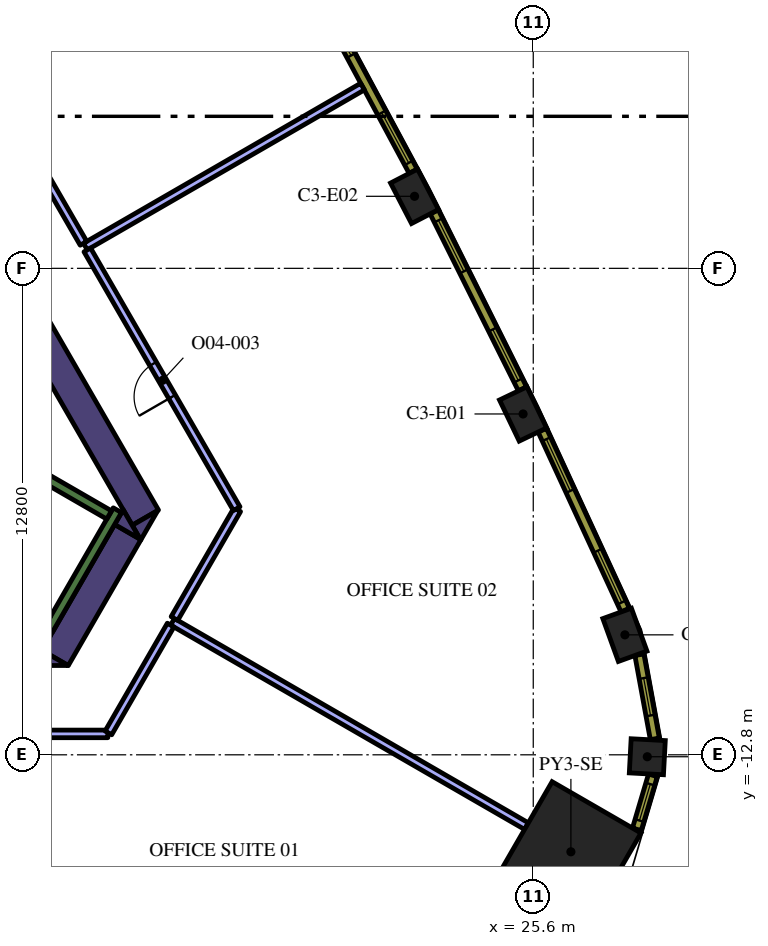
"""IFC4 building model, lengths in metres.
Left out: names, types, materials, properties, quantities, classifications, styles, units other than length and angle.
Written with IfcOpenShell. Run it as: python <this file> out.ifc"""

import sys

from ifc_helpers import new_model, si_unit, direction, frame, frame_2d, origin, origin_2d, place, context, subcontext, project, spatial, polyline, rectangle, outline, extrude, element, fill, save


model = new_model("IFC4")
c1 = context("Model", 3, precision=1e-05, world=origin(), true_north=direction((0.0, 1.0)))
c2 = subcontext(c1, "Body", "Model", "MODEL_VIEW")
j1 = project(units=[si_unit("LENGTHUNIT", "METRE"), si_unit("PLANEANGLEUNIT", "RADIAN")], contexts=[c1])
p1 = place(None, origin())
s1 = spatial("IfcSite", under=j1, at=p1, CompositionType="ELEMENT")
p2 = place(p1, origin())
s2 = spatial("IfcBuilding", under=s1, at=p2, CompositionType="ELEMENT")
p3 = place(p2, frame((0.0, 0.0, 187.8)))
s3 = spatial("IfcBuildingStorey", under=s2, at=p3, CompositionType="ELEMENT", Elevation=187.8)
p4 = place(p3, frame((26.591, -15.352, 0.0), z_axis=(0.0, 0.0, 1.0), x_axis=(0.866025403784, -0.5, 0.0)))
e1 = element("IfcColumn", 1, at=p4, inside=s3, PredefinedType="COLUMN", context=c2, shape_type="SweptSolid", body=[
    extrude(rectangle(XDim=2.7, YDim=2.7, at=origin_2d()), origin(), (0.0, 0.0, 1.0), 4.2),
])
p5 = place(p3, frame((28.601, -12.851, 0.0), z_axis=(0.0, 0.0, 1.0), x_axis=(0.0533921468, 0.998573622053, 0.0)))
e2 = element("IfcColumn", 2, at=p5, inside=s3, PredefinedType="COLUMN", context=c2, shape_type="SweptSolid", body=[
    extrude(rectangle(XDim=0.9, YDim=0.9, at=origin_2d()), origin(), (0.0, 0.0, 1.0), 4.2),
])
for number, where, z_axis, x_axis in (
    (3, (28.012, -9.644, 0.0), (0.0, 0.0, 1.0), (-0.341, 0.94, 0.0)),
    (4, (25.332, -3.832, 0.0), (0.0, 0.0, 1.0), (-0.433, 0.902, 0.0)),
    (5, (22.476, 1.896, 0.0), (0.0, 0.0, 1.0), (-0.46, 0.888, 0.0)),
):
    element("IfcColumn", number, at=place(p3, frame(where, z_axis=z_axis, x_axis=x_axis)), inside=s3, PredefinedType="COLUMN", context=c2, shape_type="SweptSolid", body=[
        extrude(rectangle(XDim=1.2, YDim=0.8, at=origin_2d()), origin(), (0.0, 0.0, 1.0), 4.2),
    ])
p6 = place(p3, frame((9.129, 4.289, 0.0), z_axis=(0.0, 0.0, 1.0), x_axis=(0.499995742806, -0.866027861663, 0.0)))
e6 = element("IfcWall", 6, at=p6, inside=s3, PredefinedType="SOLIDWALL", context=c2, shape_type="SweptSolid", body=[
    extrude(rectangle(XDim=12.527, YDim=0.8, at=frame_2d((6.264, 0.0))), origin(), (0.0, 0.0, 1.0), 4.2),
])
p7 = place(p3, origin())
e7 = element("IfcWall", 7, at=p7, inside=s3, PredefinedType="SOLIDWALL", context=c2, shape_type="SweptSolid", body=[
    extrude(outline(polyline([(15.271, -7.15), (15.047, -6.762), (15.719, -6.374), (15.271, -7.15)])), origin(), (0.0, 0.0, 1.0), 4.2),
])
p8 = place(p3, frame((13.018, -10.252, 0.0), z_axis=(0.0, 0.0, 1.0), x_axis=(0.499984020225, 0.866034629516, 0.0)))
e8 = element("IfcWall", 8, at=p8, inside=s3, PredefinedType="SOLIDWALL", context=c2, shape_type="SweptSolid", body=[
    extrude(rectangle(XDim=3.824, YDim=0.8, at=frame_2d((1.912, 0.0))), origin(), (0.0, 0.0, 1.0), 4.2),
])
e9 = element("IfcWall", 9, at=p7, inside=s3, PredefinedType="SOLIDWALL", context=c2, shape_type="SweptSolid", body=[
    extrude(outline(polyline([(12.671, -10.053), (13.358, -10.45), (12.442, -10.45), (12.671, -10.053)])), origin(), (0.0, 0.0, 1.0), 4.2),
])
e10 = element("IfcWall", 10, at=p7, inside=s3, PredefinedType="SOLIDWALL", context=c2, shape_type="SweptSolid", body=[
    extrude(outline(polyline([(14.809, -6.35), (15.257, -7.126), (14.585, -6.738), (14.809, -6.35)])), origin(), (0.0, 0.0, 1.0), 4.2),
])
p9 = place(p3, frame((12.84, -9.511, 0.0), z_axis=(0.0, 0.0, 1.0), x_axis=(0.499997733992, 0.866026712061, 0.0)))
e11 = element("IfcWall", 11, at=p9, inside=s3, PredefinedType="SOLIDWALL", context=c2, shape_type="SweptSolid", body=[
    extrude(rectangle(XDim=3.634, YDim=0.25, at=frame_2d((1.817, 0.0))), origin(), (0.0, 0.0, 1.0), 4.2),
])
p10 = place(p3, frame((8.334, -2.964, 0.0), z_axis=(0.0, 0.0, 1.0), x_axis=(0.866016039709, -0.500016218704, 0.0)))
e12 = element("IfcWall", 12, at=p10, inside=s3, PredefinedType="SOLIDWALL", context=c2, shape_type="SweptSolid", body=[
    extrude(rectangle(XDim=7.05, YDim=0.25, at=frame_2d((3.525, 0.0))), origin(), (0.0, 0.0, 1.0), 4.2),
])
p11 = place(p3, frame((16.108, -9.3, 0.0), z_axis=(0.0, 0.0, 1.0), x_axis=(0.866027180319, -0.499996922939, 0.0)))
e13 = element("IfcWall", 13, at=p11, inside=s3, PredefinedType="PARTITIONING", context=c2, shape_type="SweptSolid", body=[
    extrude(rectangle(XDim=10.754, YDim=0.2, at=frame_2d((5.377, 0.0))), origin(), (0.0, 0.0, 1.0), 3.15),
])
p12 = place(p3, frame((9.717, -12.25, 0.0), z_axis=(0.0, 0.0, 1.0), x_axis=(1.0, 0.0, 0.0)))
e14 = element("IfcWall", 14, at=p12, inside=s3, PredefinedType="PARTITIONING", context=c2, shape_type="SweptSolid", body=[
    extrude(rectangle(XDim=4.688, YDim=0.2, at=frame_2d((2.344, 0.0))), origin(), (0.0, 0.0, 1.0), 3.15),
])
p13 = place(p12, frame((1.8, 0.0, 0.0)))
e15 = element("IfcOpeningElement", 15, at=p13, cuts=e14, PredefinedType="OPENING", context=c2, shape_type="SweptSolid", body=[
    extrude(rectangle(XDim=1.0, YDim=2.1, at=frame_2d((0.5, 1.05))), frame((0.0, 0.11, 0.0), z_axis=(0.0, -1.0, 0.0), x_axis=(1.0, 0.0, 0.0)), (0.0, 0.0, 1.0), 0.22),
])
p14 = place(p3, frame((14.42, -12.224, 0.0), z_axis=(0.0, 0.0, 1.0), x_axis=(0.500001965626, 0.866024268927, 0.0)))
e16 = element("IfcWall", 16, at=p14, inside=s3, PredefinedType="PARTITIONING", context=c2, shape_type="SweptSolid", body=[
    extrude(rectangle(XDim=3.276, YDim=0.2, at=frame_2d((1.638, 0.0))), origin(), (0.0, 0.0, 1.0), 3.15),
])
p15 = place(p3, frame((13.815, 0.572, 0.0), z_axis=(0.0, 0.0, 1.0), x_axis=(0.866036391575, 0.499980968105, 0.0)))
e17 = element("IfcWall", 17, at=p15, inside=s3, PredefinedType="PARTITIONING", context=c2, shape_type="SweptSolid", body=[
    extrude(rectangle(XDim=8.42, YDim=0.2, at=frame_2d((4.21, 0.0))), origin(), (0.0, 0.0, 1.0), 3.15),
])
p16 = place(p3, frame((16.158, -9.213, 0.0), z_axis=(0.0, 0.0, 1.0), x_axis=(0.499990919662, 0.866030646256, 0.0)))
e18 = element("IfcWall", 18, at=p16, inside=s3, PredefinedType="PARTITIONING", context=c2, shape_type="SweptSolid", body=[
    extrude(rectangle(XDim=3.306, YDim=0.2, at=frame_2d((1.653, 0.0))), origin(), (0.0, 0.0, 1.0), 3.15),
])
p17 = place(p3, frame((17.796, -6.324, 0.0), z_axis=(0.0, 0.0, 1.0), x_axis=(-0.500026166427, 0.866010296064, 0.0)))
e19 = element("IfcWall", 19, at=p17, inside=s3, PredefinedType="PARTITIONING", context=c2, shape_type="SweptSolid", body=[
    extrude(rectangle(XDim=7.863, YDim=0.2, at=frame_2d((3.931, 0.0))), origin(), (0.0, 0.0, 1.0), 3.15),
])
p18 = place(p17, frame((3.4, 0.0, 0.0)))
e20 = element("IfcOpeningElement", 20, at=p18, cuts=e19, PredefinedType="OPENING", context=c2, shape_type="SweptSolid", body=[
    extrude(rectangle(XDim=1.0, YDim=2.1, at=frame_2d((0.5, 1.05))), frame((0.0, 0.11, 0.0), z_axis=(0.0, -1.0, 0.0), x_axis=(1.0, 0.0, 0.0)), (0.0, 0.0, 1.0), 0.22),
])
p19 = place(p3, frame((13.765, 0.659, 0.0), z_axis=(0.0, 0.0, 1.0), x_axis=(-0.500046568876, 0.865998515562, 0.0)))
e21 = element("IfcWall", 21, at=p19, inside=s3, PredefinedType="PARTITIONING", context=c2, shape_type="SweptSolid", body=[
    extrude(rectangle(XDim=2.782, YDim=0.2, at=frame_2d((1.391, 0.0))), origin(), (0.0, 0.0, 1.0), 3.15),
])
p20 = place(p3, frame((28.326, -14.76, 0.0), z_axis=(0.0, 0.0, 1.0), x_axis=(0.284413721403, 0.958701640281, 0.0)))
e22 = element("IfcWall", 22, at=p20, inside=s3, PredefinedType="SOLIDWALL", context=c2, shape_type="SweptSolid", body=[
    extrude(rectangle(XDim=1.482, YDim=0.24, at=frame_2d((0.741, 0.0))), origin(), (0.0, 0.0, 1.0), 3.95),
])
p21 = place(p20, frame((0.241, 0.0, 0.9)))
e23 = element("IfcOpeningElement", 23, at=p21, cuts=e22, PredefinedType="OPENING", context=c2, shape_type="SweptSolid", body=[
    extrude(rectangle(XDim=1.0, YDim=2.55, at=frame_2d((0.5, 1.275))), frame((0.0, 0.13, 0.0), z_axis=(0.0, -1.0, 0.0), x_axis=(1.0, 0.0, 0.0)), (0.0, 0.0, 1.0), 0.26),
])
p22 = place(p3, frame((28.799, -12.38, 0.0), z_axis=(0.0, 0.0, 1.0), x_axis=(-0.180737189259, 0.983531427265, 0.0)))
e24 = element("IfcWall", 24, at=p22, inside=s3, PredefinedType="SOLIDWALL", context=c2, shape_type="SweptSolid", body=[
    extrude(rectangle(XDim=2.25, YDim=0.24, at=frame_2d((1.125, 0.0))), origin(), (0.0, 0.0, 1.0), 3.95),
])
p23 = place(p22, frame((0.625, 0.0, 0.9)))
e25 = element("IfcOpeningElement", 25, at=p23, cuts=e24, PredefinedType="OPENING", context=c2, shape_type="SweptSolid", body=[
    extrude(rectangle(XDim=1.0, YDim=2.55, at=frame_2d((0.5, 1.275))), frame((0.0, 0.13, 0.0), z_axis=(0.0, -1.0, 0.0), x_axis=(1.0, 0.0, 0.0)), (0.0, 0.0, 1.0), 0.26),
])
p24 = place(p3, frame((28.02, -8.992, 0.0), z_axis=(0.0, 0.0, 1.0), x_axis=(-0.418722559465, 0.908114209885, 0.0)))
e26 = element("IfcWall", 26, at=p24, inside=s3, PredefinedType="SOLIDWALL", context=c2, shape_type="SweptSolid", body=[
    extrude(rectangle(XDim=5.213, YDim=0.24, at=frame_2d((2.606, 0.0))), origin(), (0.0, 0.0, 1.0), 3.95),
])
p25 = place(p24, frame((0.221, 0.0, 0.9)))
e27 = element("IfcOpeningElement", 27, at=p25, cuts=e26, PredefinedType="OPENING", context=c2, shape_type="SweptSolid", body=[
    extrude(rectangle(XDim=1.5, YDim=2.55, at=frame_2d((0.75, 1.275))), frame((0.0, 0.13, 0.0), z_axis=(0.0, -1.0, 0.0), x_axis=(1.0, 0.0, 0.0)), (0.0, 0.0, 1.0), 0.26),
])
p26 = place(p24, frame((3.452, 0.0, 0.9)))
e28 = element("IfcOpeningElement", 28, at=p26, cuts=e26, PredefinedType="OPENING", context=c2, shape_type="SweptSolid", body=[
    extrude(rectangle(XDim=1.5, YDim=2.55, at=frame_2d((0.75, 1.275))), frame((0.0, 0.13, 0.0), z_axis=(0.0, -1.0, 0.0), x_axis=(1.0, 0.0, 0.0)), (0.0, 0.0, 1.0), 0.26),
])
p27 = place(p3, frame((25.316, -3.171, 0.0), z_axis=(0.0, 0.0, 1.0), x_axis=(-0.446256171312, 0.8949052629, 0.0)))
e29 = element("IfcWall", 29, at=p27, inside=s3, PredefinedType="SOLIDWALL", context=c2, shape_type="SweptSolid", body=[
    extrude(rectangle(XDim=5.203, YDim=0.24, at=frame_2d((2.602, 0.0))), origin(), (0.0, 0.0, 1.0), 3.95),
])
p28 = place(p27, frame((0.248, 0.0, 0.9)))
e30 = element("IfcOpeningElement", 30, at=p28, cuts=e29, PredefinedType="OPENING", context=c2, shape_type="SweptSolid", body=[
    extrude(rectangle(XDim=1.5, YDim=2.55, at=frame_2d((0.75, 1.275))), frame((0.0, 0.13, 0.0), z_axis=(0.0, -1.0, 0.0), x_axis=(1.0, 0.0, 0.0)), (0.0, 0.0, 1.0), 0.26),
])
p29 = place(p27, frame((3.455, 0.0, 0.9)))
e31 = element("IfcOpeningElement", 31, at=p29, cuts=e29, PredefinedType="OPENING", context=c2, shape_type="SweptSolid", body=[
    extrude(rectangle(XDim=1.5, YDim=2.55, at=frame_2d((0.75, 1.275))), frame((0.0, 0.13, 0.0), z_axis=(0.0, -1.0, 0.0), x_axis=(1.0, 0.0, 0.0)), (0.0, 0.0, 1.0), 0.26),
])
p30 = place(p3, frame((22.44, 2.555, 0.0), z_axis=(0.0, 0.0, 1.0), x_axis=(-0.473349833294, 0.880874528704, 0.0)))
e32 = element("IfcWall", 32, at=p30, inside=s3, PredefinedType="SOLIDWALL", context=c2, shape_type="SweptSolid", body=[
    extrude(rectangle(XDim=5.204, YDim=0.24, at=frame_2d((2.602, 0.0))), origin(), (0.0, 0.0, 1.0), 3.95),
])
p31 = place(p30, frame((0.248, 0.0, 0.9)))
e33 = element("IfcOpeningElement", 33, at=p31, cuts=e32, PredefinedType="OPENING", context=c2, shape_type="SweptSolid", body=[
    extrude(rectangle(XDim=1.5, YDim=2.55, at=frame_2d((0.75, 1.275))), frame((0.0, 0.13, 0.0), z_axis=(0.0, -1.0, 0.0), x_axis=(1.0, 0.0, 0.0)), (0.0, 0.0, 1.0), 0.26),
])
p32 = place(p30, frame((3.455, 0.0, 0.9)))
e34 = element("IfcOpeningElement", 34, at=p32, cuts=e32, PredefinedType="OPENING", context=c2, shape_type="SweptSolid", body=[
    extrude(rectangle(XDim=1.5, YDim=2.55, at=frame_2d((0.75, 1.275))), frame((0.0, 0.13, 0.0), z_axis=(0.0, -1.0, 0.0), x_axis=(1.0, 0.0, 0.0)), (0.0, 0.0, 1.0), 0.26),
])
p33 = place(p18, origin())
e35 = element("IfcDoor", 35, at=p33, inside=s3, OperationType="SINGLE_SWING_LEFT", PredefinedType="DOOR", context=c2, shape_type="SweptSolid", body=[
    extrude(rectangle(XDim=1.0, YDim=2.1, at=frame_2d((0.5, 1.05))), frame((0.0, 0.025, 0.0), z_axis=(0.0, -1.0, 0.0), x_axis=(1.0, 0.0, 0.0)), (0.0, 0.0, 1.0), 0.05),
])
fill(e20, e35)
p34 = place(p21, origin())
e36 = element("IfcWindow", 36, at=p34, inside=s3, PartitioningType="SINGLE_PANEL", PredefinedType="WINDOW", context=c2, shape_type="SweptSolid", body=[
    extrude(rectangle(XDim=1.0, YDim=2.55, at=frame_2d((0.5, 1.275))), frame((0.0, 0.04, 0.0), z_axis=(0.0, -1.0, 0.0), x_axis=(1.0, 0.0, 0.0)), (0.0, 0.0, 1.0), 0.06),
])
fill(e23, e36)
p35 = place(p23, origin())
e37 = element("IfcWindow", 37, at=p35, inside=s3, PartitioningType="SINGLE_PANEL", PredefinedType="WINDOW", context=c2, shape_type="SweptSolid", body=[
    extrude(rectangle(XDim=1.0, YDim=2.55, at=frame_2d((0.5, 1.275))), frame((0.0, 0.04, 0.0), z_axis=(0.0, -1.0, 0.0), x_axis=(1.0, 0.0, 0.0)), (0.0, 0.0, 1.0), 0.06),
])
fill(e25, e37)
p36 = place(p25, origin())
e38 = element("IfcWindow", 38, at=p36, inside=s3, PartitioningType="SINGLE_PANEL", PredefinedType="WINDOW", context=c2, shape_type="SweptSolid", body=[
    extrude(rectangle(XDim=1.5, YDim=2.55, at=frame_2d((0.75, 1.275))), frame((0.0, 0.04, 0.0), z_axis=(0.0, -1.0, 0.0), x_axis=(1.0, 0.0, 0.0)), (0.0, 0.0, 1.0), 0.06),
])
fill(e27, e38)
p37 = place(p26, origin())
e39 = element("IfcWindow", 39, at=p37, inside=s3, PartitioningType="SINGLE_PANEL", PredefinedType="WINDOW", context=c2, shape_type="SweptSolid", body=[
    extrude(rectangle(XDim=1.5, YDim=2.55, at=frame_2d((0.75, 1.275))), frame((0.0, 0.04, 0.0), z_axis=(0.0, -1.0, 0.0), x_axis=(1.0, 0.0, 0.0)), (0.0, 0.0, 1.0), 0.06),
])
fill(e28, e39)
p38 = place(p28, origin())
e40 = element("IfcWindow", 40, at=p38, inside=s3, PartitioningType="SINGLE_PANEL", PredefinedType="WINDOW", context=c2, shape_type="SweptSolid", body=[
    extrude(rectangle(XDim=1.5, YDim=2.55, at=frame_2d((0.75, 1.275))), frame((0.0, 0.04, 0.0), z_axis=(0.0, -1.0, 0.0), x_axis=(1.0, 0.0, 0.0)), (0.0, 0.0, 1.0), 0.06),
])
fill(e30, e40)
p39 = place(p29, origin())
e41 = element("IfcWindow", 41, at=p39, inside=s3, PartitioningType="SINGLE_PANEL", PredefinedType="WINDOW", context=c2, shape_type="SweptSolid", body=[
    extrude(rectangle(XDim=1.5, YDim=2.55, at=frame_2d((0.75, 1.275))), frame((0.0, 0.04, 0.0), z_axis=(0.0, -1.0, 0.0), x_axis=(1.0, 0.0, 0.0)), (0.0, 0.0, 1.0), 0.06),
])
fill(e31, e41)
p40 = place(p31, origin())
e42 = element("IfcWindow", 42, at=p40, inside=s3, PartitioningType="SINGLE_PANEL", PredefinedType="WINDOW", context=c2, shape_type="SweptSolid", body=[
    extrude(rectangle(XDim=1.5, YDim=2.55, at=frame_2d((0.75, 1.275))), frame((0.0, 0.04, 0.0), z_axis=(0.0, -1.0, 0.0), x_axis=(1.0, 0.0, 0.0)), (0.0, 0.0, 1.0), 0.06),
])
fill(e33, e42)
p41 = place(p32, origin())
e43 = element("IfcWindow", 43, at=p41, inside=s3, PartitioningType="SINGLE_PANEL", PredefinedType="WINDOW", context=c2, shape_type="SweptSolid", body=[
    extrude(rectangle(XDim=1.5, YDim=2.55, at=frame_2d((0.75, 1.275))), frame((0.0, 0.04, 0.0), z_axis=(0.0, -1.0, 0.0), x_axis=(1.0, 0.0, 0.0)), (0.0, 0.0, 1.0), 0.06),
])
fill(e34, e43)
save(model, sys.argv[1])
